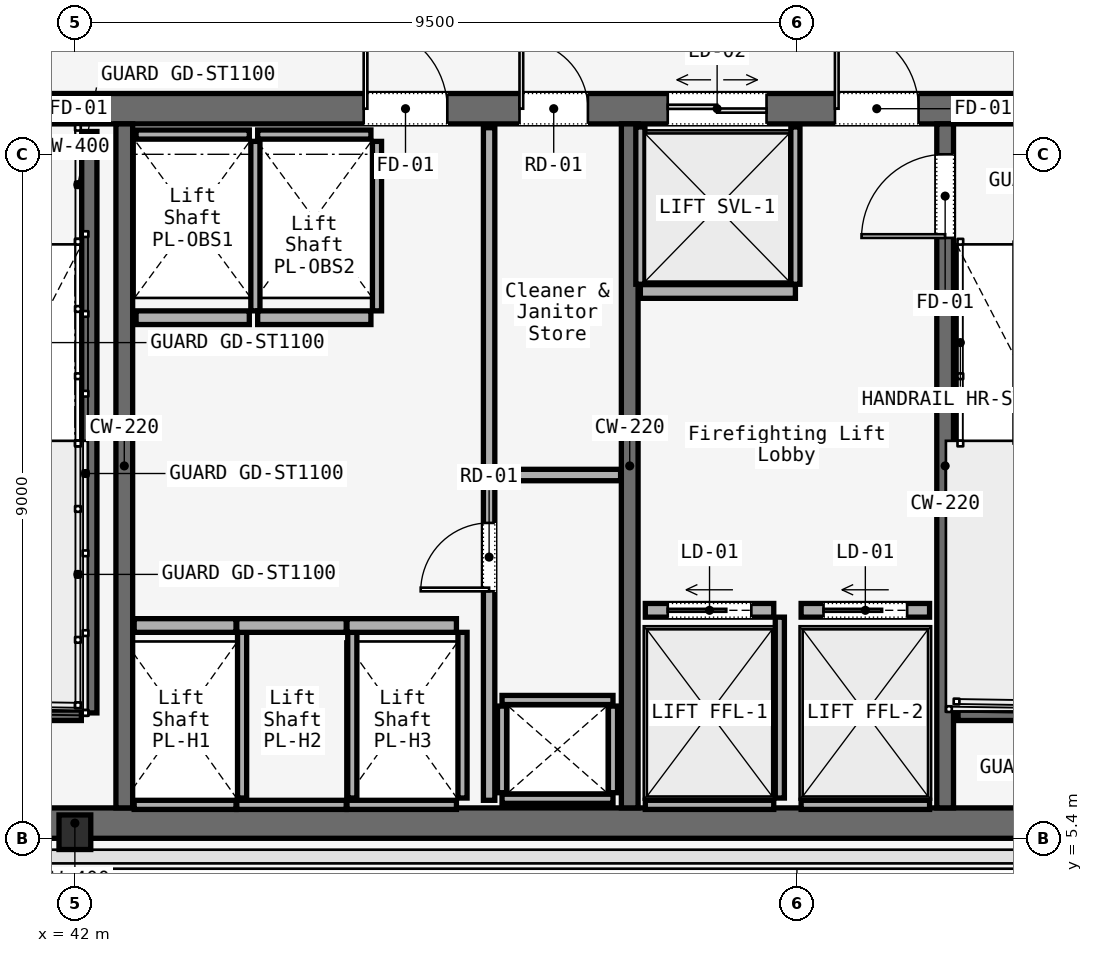
"""IFC4 building model, lengths in metres.
Left out: names, types, materials, properties, quantities, classifications, styles, units other than length and angle.
Written with IfcOpenShell. Run it as: python <this file> out.ifc"""

import sys

from ifc_helpers import new_model, si_unit, direction, frame, frame_2d, origin, origin_2d, place, context, subcontext, project, spatial, rectangle, i_section, extrude, element, fill, save


model = new_model("IFC4")
c1 = context("Model", 3, precision=1e-05, world=origin(), true_north=direction((0.0, 1.0)))
c2 = subcontext(c1, "Body", "Model", "MODEL_VIEW")
j1 = project(units=[si_unit("LENGTHUNIT", "METRE"), si_unit("PLANEANGLEUNIT", "RADIAN")], contexts=[c1])
p1 = place(None, origin())
s1 = spatial("IfcSite", under=j1, at=p1, CompositionType="ELEMENT")
p2 = place(p1, origin())
s2 = spatial("IfcBuilding", under=s1, at=p2, CompositionType="ELEMENT")
p3 = place(p2, frame((0.0, 0.0, 176.4)))
s3 = spatial("IfcBuildingStorey", under=s2, at=p3, CompositionType="ELEMENT", Elevation=176.4)
p4 = place(p3, frame((26.45, 15.0, 0.0), z_axis=(0.0, 0.0, 1.0), x_axis=(1.0, 0.0, 0.0)))
e1 = element("IfcWall", 1, at=p4, inside=s3, PredefinedType="SOLIDWALL", context=c2, shape_type="SweptSolid", body=[
    extrude(rectangle(XDim=31.1, YDim=0.4, at=frame_2d((15.55, 0.0))), origin(), (0.0, 0.0, 1.0), 3.58),
])
p5 = place(p4, frame((1.65, 0.0, 0.0)))
e2 = element("IfcOpeningElement", 2, at=p5, cuts=e1, PredefinedType="OPENING", context=c2, shape_type="SweptSolid", body=[
    extrude(rectangle(XDim=1.1, YDim=2.2, at=frame_2d((0.55, 1.1))), frame((0.0, 0.2, 0.0), z_axis=(0.0, -1.0, 0.0), x_axis=(1.0, 0.0, 0.0)), (0.0, 0.0, 1.0), 0.4),
])
p6 = place(p4, frame((13.65, 0.0, 0.0)))
e3 = element("IfcOpeningElement", 3, at=p6, cuts=e1, PredefinedType="OPENING", context=c2, shape_type="SweptSolid", body=[
    extrude(rectangle(XDim=1.1, YDim=2.2, at=frame_2d((0.55, 1.1))), frame((0.0, 0.2, 0.0), z_axis=(0.0, -1.0, 0.0), x_axis=(1.0, 0.0, 0.0)), (0.0, 0.0, 1.0), 0.4),
])
p7 = place(p4, frame((25.55, 0.0, 0.0)))
e4 = element("IfcOpeningElement", 4, at=p7, cuts=e1, PredefinedType="OPENING", context=c2, shape_type="SweptSolid", body=[
    extrude(rectangle(XDim=1.1, YDim=2.2, at=frame_2d((0.55, 1.1))), frame((0.0, 0.2, 0.0), z_axis=(0.0, -1.0, 0.0), x_axis=(1.0, 0.0, 0.0)), (0.0, 0.0, 1.0), 0.4),
])
p8 = place(p4, frame((10.7, 0.0, 0.0)))
e5 = element("IfcOpeningElement", 5, at=p8, cuts=e1, PredefinedType="OPENING", context=c2, shape_type="SweptSolid", body=[
    extrude(rectangle(XDim=1.4, YDim=2.2, at=frame_2d((0.7, 1.1))), frame((0.0, 0.2, 0.0), z_axis=(0.0, -1.0, 0.0), x_axis=(1.0, 0.0, 0.0)), (0.0, 0.0, 1.0), 0.4),
])
p9 = place(p4, frame((19.35, 0.0, 0.0)))
e6 = element("IfcOpeningElement", 6, at=p9, cuts=e1, PredefinedType="OPENING", context=c2, shape_type="SweptSolid", body=[
    extrude(rectangle(XDim=1.1, YDim=2.2, at=frame_2d((0.55, 1.1))), frame((0.0, 0.2, 0.0), z_axis=(0.0, -1.0, 0.0), x_axis=(1.0, 0.0, 0.0)), (0.0, 0.0, 1.0), 0.4),
])
p10 = place(p4, frame((21.4, 0.0, 0.0)))
e7 = element("IfcOpeningElement", 7, at=p10, cuts=e1, PredefinedType="OPENING", context=c2, shape_type="SweptSolid", body=[
    extrude(rectangle(XDim=0.9, YDim=2.1, at=frame_2d((0.45, 1.05))), frame((0.0, 0.2, 0.0), z_axis=(0.0, -1.0, 0.0), x_axis=(1.0, 0.0, 0.0)), (0.0, 0.0, 1.0), 0.4),
])
p11 = place(p4, frame((23.35, 0.0, 0.0)))
e8 = element("IfcOpeningElement", 8, at=p11, cuts=e1, PredefinedType="OPENING", context=c2, shape_type="SweptSolid", body=[
    extrude(rectangle(XDim=1.3, YDim=2.3, at=frame_2d((0.65, 1.15))), frame((0.0, 0.2, 0.0), z_axis=(0.0, -1.0, 0.0), x_axis=(1.0, 0.0, 0.0)), (0.0, 0.0, 1.0), 0.4),
])
p12 = place(p3, frame((26.45, 5.6, 0.0), z_axis=(0.0, 0.0, 1.0), x_axis=(1.0, 0.0, 0.0)))
e9 = element("IfcWall", 9, at=p12, inside=s3, PredefinedType="SOLIDWALL", context=c2, shape_type="SweptSolid", body=[
    extrude(rectangle(XDim=31.1, YDim=0.4, at=frame_2d((15.55, 0.0))), origin(), (0.0, 0.0, 1.0), 3.58),
])
for number, where, z_axis, x_axis in (
    (10, (42.65, 5.8, 0.0), (0.0, 0.0, 1.0), (0.0, 1.0, 0.0)),
    (11, (49.3, 5.8, 0.0), (0.0, 0.0, 1.0), (0.0, 1.0, 0.0)),
):
    element("IfcWall", number, at=place(p3, frame(where, z_axis=z_axis, x_axis=x_axis)), inside=s3, PredefinedType="SOLIDWALL", context=c2, shape_type="SweptSolid", body=[
        extrude(rectangle(XDim=9.0, YDim=0.22, at=frame_2d((4.5, 0.0))), origin(), (0.0, 0.0, 1.0), 3.58),
    ])
p13 = place(p3, frame((53.45, 5.8, 0.0), z_axis=(0.0, 0.0, 1.0), x_axis=(0.0, 1.0, 0.0)))
e12 = element("IfcWall", 12, at=p13, inside=s3, PredefinedType="SOLIDWALL", context=c2, shape_type="SweptSolid", body=[
    extrude(rectangle(XDim=9.0, YDim=0.22, at=frame_2d((4.5, 0.0))), origin(), (0.0, 0.0, 1.0), 3.58),
])
p14 = place(p13, frame((7.5, 0.0, 0.0)))
e13 = element("IfcOpeningElement", 13, at=p14, cuts=e12, PredefinedType="OPENING", context=c2, shape_type="SweptSolid", body=[
    extrude(rectangle(XDim=1.1, YDim=2.2, at=frame_2d((0.55, 1.1))), frame((0.0, 0.11, 0.0), z_axis=(0.0, -1.0, 0.0), x_axis=(1.0, 0.0, 0.0)), (0.0, 0.0, 1.0), 0.22),
])
p15 = place(p3, frame((42.0, 5.48, 0.0), z_axis=(0.0, 0.0, 1.0), x_axis=(1.0, 0.0, 0.0)))
e14 = element("IfcColumn", 14, at=p15, inside=s3, PredefinedType="COLUMN", context=c2, shape_type="SweptSolid", body=[
    extrude(i_section(OverallWidth=0.418, OverallDepth=0.455, WebThickness=0.042, FlangeThickness=0.052, FilletRadius=0.015, at=origin_2d()), origin(), (0.0, 0.0, 1.0), 3.58),
])
p16 = place(p3, frame((42.19, 14.7, 0.0), z_axis=(0.0, 0.0, 1.0), x_axis=(0.0, -1.0, 0.0)))
e15 = element("IfcWall", 15, at=p16, inside=s3, PredefinedType="SOLIDWALL", context=c2, shape_type="SweptSolid", body=[
    extrude(rectangle(XDim=7.65, YDim=0.2, at=frame_2d((3.825, 0.0))), origin(), (0.0, 0.0, 1.0), 3.8),
])
for number, where, z_axis, x_axis in (
    (16, (38.97, 7.05, 0.0), (0.0, 0.0, 1.0), (1.0, 0.0, 0.0)),
    (17, (53.62, 7.05, 0.0), (0.0, 0.0, 1.0), (1.0, 0.0, 0.0)),
):
    element("IfcWall", number, at=place(p3, frame(where, z_axis=z_axis, x_axis=x_axis)), inside=s3, PredefinedType="SOLIDWALL", context=c2, shape_type="SweptSolid", body=[
        extrude(rectangle(XDim=3.115, YDim=0.2, at=frame_2d((1.558, 0.0))), origin(), (0.0, 0.0, 1.0), 3.8),
    ])
for number, where, z_axis, x_axis in (
    (18, (47.62, 5.92, 0.0), (0.0, 0.0, 1.0), (1.0, 0.0, 0.0)),
    (19, (47.62, 7.22, 0.0), (0.0, 0.0, 1.0), (1.0, 0.0, 0.0)),
):
    element("IfcWall", number, at=place(p3, frame(where, z_axis=z_axis, x_axis=x_axis)), inside=s3, PredefinedType="SOLIDWALL", context=c2, shape_type="SweptSolid", body=[
        extrude(rectangle(XDim=1.46, YDim=0.12, at=frame_2d((0.73, 0.0))), origin(), (0.0, 0.0, 1.0), 3.01),
    ])
for number, where, z_axis, x_axis in (
    (20, (47.62, 6.0, 0.0), (0.0, 0.0, 1.0), (0.0, 1.0, 0.0)),
    (21, (49.08, 6.0, 0.0), (0.0, 0.0, 1.0), (0.0, 1.0, 0.0)),
):
    element("IfcWall", number, at=place(p3, frame(where, z_axis=z_axis, x_axis=x_axis)), inside=s3, PredefinedType="SOLIDWALL", context=c2, shape_type="SweptSolid", body=[
        extrude(rectangle(XDim=1.14, YDim=0.12, at=frame_2d((0.57, 0.0))), origin(), (0.0, 0.0, 1.0), 3.01),
    ])
p17 = place(p3, frame((47.45, 5.9, 0.0), z_axis=(0.0, 0.0, 1.0), x_axis=(0.0, 1.0, 0.0)))
e22 = element("IfcWall", 22, at=p17, inside=s3, PredefinedType="PARTITIONING", context=c2, shape_type="SweptSolid", body=[
    extrude(rectangle(XDim=8.85, YDim=0.15, at=frame_2d((4.425, 0.0))), origin(), (0.0, 0.0, 1.0), 3.01),
])
p18 = place(p17, frame((2.75, 0.0, 0.0)))
e23 = element("IfcOpeningElement", 23, at=p18, cuts=e22, PredefinedType="OPENING", context=c2, shape_type="SweptSolid", body=[
    extrude(rectangle(XDim=0.9, YDim=2.1, at=frame_2d((0.45, 1.05))), frame((0.0, 0.075, 0.0), z_axis=(0.0, -1.0, 0.0), x_axis=(1.0, 0.0, 0.0)), (0.0, 0.0, 1.0), 0.15),
])
p19 = place(p3, frame((47.45, 10.18, 0.0), z_axis=(0.0, 0.0, 1.0), x_axis=(1.0, 0.0, 0.0)))
e24 = element("IfcWall", 24, at=p19, inside=s3, PredefinedType="PARTITIONING", context=c2, shape_type="SweptSolid", body=[
    extrude(rectangle(XDim=1.73, YDim=0.15, at=frame_2d((0.865, 0.0))), origin(), (0.0, 0.0, 1.0), 3.01),
])
p20 = place(p3, frame((42.78, 8.2, 0.0), z_axis=(0.0, 0.0, 1.0), x_axis=(1.0, 0.0, 0.0)))
e25 = element("IfcWall", 25, at=p20, inside=s3, PredefinedType="SOLIDWALL", context=c2, shape_type="SweptSolid", body=[
    extrude(rectangle(XDim=1.34, YDim=0.18, at=frame_2d((0.67, 0.0))), origin(), (0.0, 0.0, 1.0), 3.01),
])
p21 = place(p3, frame((42.78, 5.84, 0.0), z_axis=(0.0, 0.0, 1.0), x_axis=(1.0, 0.0, 0.0)))
e26 = element("IfcWall", 26, at=p21, inside=s3, PredefinedType="SOLIDWALL", context=c2, shape_type="SweptSolid", body=[
    extrude(rectangle(XDim=1.34, YDim=0.12, at=frame_2d((0.67, 0.0))), origin(), (0.0, 0.0, 1.0), 3.01),
])
p22 = place(p3, frame((44.2, 5.93, 0.0), z_axis=(0.0, 0.0, 1.0), x_axis=(0.0, 1.0, 0.0)))
e27 = element("IfcWall", 27, at=p22, inside=s3, PredefinedType="SOLIDWALL", context=c2, shape_type="SweptSolid", body=[
    extrude(rectangle(XDim=2.18, YDim=0.12, at=frame_2d((1.09, 0.0))), origin(), (0.0, 0.0, 1.0), 3.01),
])
p23 = place(p3, frame((44.13, 8.2, 0.0), z_axis=(0.0, 0.0, 1.0), x_axis=(1.0, 0.0, 0.0)))
e28 = element("IfcWall", 28, at=p23, inside=s3, PredefinedType="SOLIDWALL", context=c2, shape_type="SweptSolid", body=[
    extrude(rectangle(XDim=1.44, YDim=0.18, at=frame_2d((0.72, 0.0))), origin(), (0.0, 0.0, 1.0), 3.01),
])
p24 = place(p3, frame((44.13, 5.84, 0.0), z_axis=(0.0, 0.0, 1.0), x_axis=(1.0, 0.0, 0.0)))
e29 = element("IfcWall", 29, at=p24, inside=s3, PredefinedType="SOLIDWALL", context=c2, shape_type="SweptSolid", body=[
    extrude(rectangle(XDim=1.44, YDim=0.12, at=frame_2d((0.72, 0.0))), origin(), (0.0, 0.0, 1.0), 3.01),
])
p25 = place(p3, frame((45.65, 5.93, 0.0), z_axis=(0.0, 0.0, 1.0), x_axis=(0.0, 1.0, 0.0)))
e30 = element("IfcWall", 30, at=p25, inside=s3, PredefinedType="SOLIDWALL", context=c2, shape_type="SweptSolid", body=[
    extrude(rectangle(XDim=2.18, YDim=0.12, at=frame_2d((1.09, 0.0))), origin(), (0.0, 0.0, 1.0), 3.01),
])
p26 = place(p3, frame((45.58, 8.2, 0.0), z_axis=(0.0, 0.0, 1.0), x_axis=(1.0, 0.0, 0.0)))
e31 = element("IfcWall", 31, at=p26, inside=s3, PredefinedType="SOLIDWALL", context=c2, shape_type="SweptSolid", body=[
    extrude(rectangle(XDim=1.44, YDim=0.18, at=frame_2d((0.72, 0.0))), origin(), (0.0, 0.0, 1.0), 3.01),
])
p27 = place(p3, frame((45.58, 5.84, 0.0), z_axis=(0.0, 0.0, 1.0), x_axis=(1.0, 0.0, 0.0)))
e32 = element("IfcWall", 32, at=p27, inside=s3, PredefinedType="SOLIDWALL", context=c2, shape_type="SweptSolid", body=[
    extrude(rectangle(XDim=1.44, YDim=0.12, at=frame_2d((0.72, 0.0))), origin(), (0.0, 0.0, 1.0), 3.01),
])
p28 = place(p3, frame((47.1, 5.93, 0.0), z_axis=(0.0, 0.0, 1.0), x_axis=(0.0, 1.0, 0.0)))
e33 = element("IfcWall", 33, at=p28, inside=s3, PredefinedType="SOLIDWALL", context=c2, shape_type="SweptSolid", body=[
    extrude(rectangle(XDim=2.18, YDim=0.12, at=frame_2d((1.09, 0.0))), origin(), (0.0, 0.0, 1.0), 3.01),
])
p29 = place(p3, frame((42.805, 12.25, 0.0), z_axis=(0.0, 0.0, 1.0), x_axis=(1.0, 0.0, 0.0)))
e34 = element("IfcWall", 34, at=p29, inside=s3, PredefinedType="SOLIDWALL", context=c2, shape_type="SweptSolid", body=[
    extrude(rectangle(XDim=1.49, YDim=0.18, at=frame_2d((0.745, 0.0))), origin(), (0.0, 0.0, 1.0), 3.01),
])
p30 = place(p3, frame((42.805, 14.66, 0.0), z_axis=(0.0, 0.0, 1.0), x_axis=(1.0, 0.0, 0.0)))
e35 = element("IfcWall", 35, at=p30, inside=s3, PredefinedType="SOLIDWALL", context=c2, shape_type="SweptSolid", body=[
    extrude(rectangle(XDim=1.49, YDim=0.12, at=frame_2d((0.745, 0.0))), origin(), (0.0, 0.0, 1.0), 3.01),
])
p31 = place(p3, frame((44.375, 12.34, 0.0), z_axis=(0.0, 0.0, 1.0), x_axis=(0.0, 1.0, 0.0)))
e36 = element("IfcWall", 36, at=p31, inside=s3, PredefinedType="SOLIDWALL", context=c2, shape_type="SweptSolid", body=[
    extrude(rectangle(XDim=2.23, YDim=0.12, at=frame_2d((1.115, 0.0))), origin(), (0.0, 0.0, 1.0), 3.01),
])
p32 = place(p3, frame((44.405, 12.25, 0.0), z_axis=(0.0, 0.0, 1.0), x_axis=(1.0, 0.0, 0.0)))
e37 = element("IfcWall", 37, at=p32, inside=s3, PredefinedType="SOLIDWALL", context=c2, shape_type="SweptSolid", body=[
    extrude(rectangle(XDim=1.49, YDim=0.18, at=frame_2d((0.745, 0.0))), origin(), (0.0, 0.0, 1.0), 3.01),
])
p33 = place(p3, frame((44.405, 14.66, 0.0), z_axis=(0.0, 0.0, 1.0), x_axis=(1.0, 0.0, 0.0)))
e38 = element("IfcWall", 38, at=p33, inside=s3, PredefinedType="SOLIDWALL", context=c2, shape_type="SweptSolid", body=[
    extrude(rectangle(XDim=1.49, YDim=0.12, at=frame_2d((0.745, 0.0))), origin(), (0.0, 0.0, 1.0), 3.01),
])
p34 = place(p3, frame((45.975, 12.34, 0.0), z_axis=(0.0, 0.0, 1.0), x_axis=(0.0, 1.0, 0.0)))
e39 = element("IfcWall", 39, at=p34, inside=s3, PredefinedType="SOLIDWALL", context=c2, shape_type="SweptSolid", body=[
    extrude(rectangle(XDim=2.23, YDim=0.12, at=frame_2d((1.115, 0.0))), origin(), (0.0, 0.0, 1.0), 3.01),
])
p35 = place(p3, frame((49.505, 8.4, 0.0), z_axis=(0.0, 0.0, 1.0), x_axis=(1.0, 0.0, 0.0)))
e40 = element("IfcWall", 40, at=p35, inside=s3, PredefinedType="SOLIDWALL", context=c2, shape_type="SweptSolid", body=[
    extrude(rectangle(XDim=1.69, YDim=0.18, at=frame_2d((0.845, 0.0))), origin(), (0.0, 0.0, 1.0), 3.01),
])
p36 = place(p35, frame((0.295, 0.0, 0.0)))
e41 = element("IfcOpeningElement", 41, at=p36, cuts=e40, PredefinedType="OPENING", context=c2, shape_type="SweptSolid", body=[
    extrude(rectangle(XDim=1.1, YDim=2.2, at=frame_2d((0.55, 1.1))), frame((0.0, 0.09, 0.0), z_axis=(0.0, -1.0, 0.0), x_axis=(1.0, 0.0, 0.0)), (0.0, 0.0, 1.0), 0.18),
])
p37 = place(p3, frame((49.505, 5.84, 0.0), z_axis=(0.0, 0.0, 1.0), x_axis=(1.0, 0.0, 0.0)))
e42 = element("IfcWall", 42, at=p37, inside=s3, PredefinedType="SOLIDWALL", context=c2, shape_type="SweptSolid", body=[
    extrude(rectangle(XDim=1.69, YDim=0.12, at=frame_2d((0.845, 0.0))), origin(), (0.0, 0.0, 1.0), 3.01),
])
p38 = place(p3, frame((51.275, 5.93, 0.0), z_axis=(0.0, 0.0, 1.0), x_axis=(0.0, 1.0, 0.0)))
e43 = element("IfcWall", 43, at=p38, inside=s3, PredefinedType="SOLIDWALL", context=c2, shape_type="SweptSolid", body=[
    extrude(rectangle(XDim=2.38, YDim=0.12, at=frame_2d((1.19, 0.0))), origin(), (0.0, 0.0, 1.0), 3.01),
])
p39 = place(p3, frame((51.555, 8.4, 0.0), z_axis=(0.0, 0.0, 1.0), x_axis=(1.0, 0.0, 0.0)))
e44 = element("IfcWall", 44, at=p39, inside=s3, PredefinedType="SOLIDWALL", context=c2, shape_type="SweptSolid", body=[
    extrude(rectangle(XDim=1.69, YDim=0.18, at=frame_2d((0.845, 0.0))), origin(), (0.0, 0.0, 1.0), 3.01),
])
p40 = place(p39, frame((0.295, 0.0, 0.0)))
e45 = element("IfcOpeningElement", 45, at=p40, cuts=e44, PredefinedType="OPENING", context=c2, shape_type="SweptSolid", body=[
    extrude(rectangle(XDim=1.1, YDim=2.2, at=frame_2d((0.55, 1.1))), frame((0.0, 0.09, 0.0), z_axis=(0.0, -1.0, 0.0), x_axis=(1.0, 0.0, 0.0)), (0.0, 0.0, 1.0), 0.18),
])
p41 = place(p3, frame((51.555, 5.84, 0.0), z_axis=(0.0, 0.0, 1.0), x_axis=(1.0, 0.0, 0.0)))
e46 = element("IfcWall", 46, at=p41, inside=s3, PredefinedType="SOLIDWALL", context=c2, shape_type="SweptSolid", body=[
    extrude(rectangle(XDim=1.69, YDim=0.12, at=frame_2d((0.845, 0.0))), origin(), (0.0, 0.0, 1.0), 3.01),
])
p42 = place(p3, frame((49.44, 12.595, 0.0), z_axis=(0.0, 0.0, 1.0), x_axis=(1.0, 0.0, 0.0)))
e47 = element("IfcWall", 47, at=p42, inside=s3, PredefinedType="SOLIDWALL", context=c2, shape_type="SweptSolid", body=[
    extrude(rectangle(XDim=2.04, YDim=0.18, at=frame_2d((1.02, 0.0))), origin(), (0.0, 0.0, 1.0), 3.01),
])
for number, where, z_axis, x_axis in (
    (48, (49.44, 12.69, 0.0), (0.0, 0.0, 1.0), (0.0, 1.0, 0.0)),
    (49, (51.48, 12.69, 0.0), (0.0, 0.0, 1.0), (0.0, 1.0, 0.0)),
):
    element("IfcWall", number, at=place(p3, frame(where, z_axis=z_axis, x_axis=x_axis)), inside=s3, PredefinedType="SOLIDWALL", context=c2, shape_type="SweptSolid", body=[
        extrude(rectangle(XDim=2.07, YDim=0.12, at=frame_2d((1.035, 0.0))), origin(), (0.0, 0.0, 1.0), 3.01),
    ])
p43 = place(p7, origin())
e50 = element("IfcDoor", 50, at=p43, inside=s3, OperationType="SINGLE_SWING_RIGHT", PredefinedType="DOOR", context=c2, shape_type="SweptSolid", body=[
    extrude(rectangle(XDim=1.1, YDim=2.2, at=frame_2d((0.55, 1.1))), frame((0.0, 0.025, 0.0), z_axis=(0.0, -1.0, 0.0), x_axis=(1.0, 0.0, 0.0)), (0.0, 0.0, 1.0), 0.05),
])
fill(e4, e50)
p44 = place(p9, origin())
e51 = element("IfcDoor", 51, at=p44, inside=s3, OperationType="SINGLE_SWING_LEFT", PredefinedType="DOOR", context=c2, shape_type="SweptSolid", body=[
    extrude(rectangle(XDim=1.1, YDim=2.2, at=frame_2d((0.55, 1.1))), frame((0.0, 0.025, 0.0), z_axis=(0.0, -1.0, 0.0), x_axis=(1.0, 0.0, 0.0)), (0.0, 0.0, 1.0), 0.05),
])
fill(e6, e51)
p45 = place(p10, origin())
e52 = element("IfcDoor", 52, at=p45, inside=s3, OperationType="SINGLE_SWING_LEFT", PredefinedType="DOOR", context=c2, shape_type="SweptSolid", body=[
    extrude(rectangle(XDim=0.9, YDim=2.1, at=frame_2d((0.45, 1.05))), frame((0.0, 0.025, 0.0), z_axis=(0.0, -1.0, 0.0), x_axis=(1.0, 0.0, 0.0)), (0.0, 0.0, 1.0), 0.05),
])
fill(e7, e52)
p46 = place(p14, origin())
e53 = element("IfcDoor", 53, at=p46, inside=s3, OperationType="SINGLE_SWING_LEFT", PredefinedType="DOOR", context=c2, shape_type="SweptSolid", body=[
    extrude(rectangle(XDim=1.1, YDim=2.2, at=frame_2d((0.55, 1.1))), frame((0.0, 0.025, 0.0), z_axis=(0.0, -1.0, 0.0), x_axis=(1.0, 0.0, 0.0)), (0.0, 0.0, 1.0), 0.05),
])
fill(e13, e53)
p47 = place(p18, origin())
e54 = element("IfcDoor", 54, at=p47, inside=s3, OperationType="SINGLE_SWING_RIGHT", PredefinedType="DOOR", context=c2, shape_type="SweptSolid", body=[
    extrude(rectangle(XDim=0.9, YDim=2.1, at=frame_2d((0.45, 1.05))), frame((0.0, 0.025, 0.0), z_axis=(0.0, -1.0, 0.0), x_axis=(1.0, 0.0, 0.0)), (0.0, 0.0, 1.0), 0.05),
])
fill(e23, e54)
p48 = place(p36, origin())
e55 = element("IfcDoor", 55, at=p48, inside=s3, OperationType="SLIDING_TO_LEFT", PredefinedType="DOOR", context=c2, shape_type="SweptSolid", body=[
    extrude(rectangle(XDim=1.1, YDim=2.2, at=frame_2d((0.55, 1.1))), frame((0.0, 0.025, 0.0), z_axis=(0.0, -1.0, 0.0), x_axis=(1.0, 0.0, 0.0)), (0.0, 0.0, 1.0), 0.05),
])
fill(e41, e55)
p49 = place(p40, origin())
e56 = element("IfcDoor", 56, at=p49, inside=s3, OperationType="SLIDING_TO_LEFT", PredefinedType="DOOR", context=c2, shape_type="SweptSolid", body=[
    extrude(rectangle(XDim=1.1, YDim=2.2, at=frame_2d((0.55, 1.1))), frame((0.0, 0.025, 0.0), z_axis=(0.0, -1.0, 0.0), x_axis=(1.0, 0.0, 0.0)), (0.0, 0.0, 1.0), 0.05),
])
fill(e45, e56)
p50 = place(p11, origin())
e57 = element("IfcDoor", 57, at=p50, inside=s3, OperationType="DOUBLE_DOOR_SLIDING", PredefinedType="DOOR", context=c2, shape_type="SweptSolid", body=[
    extrude(rectangle(XDim=1.3, YDim=2.3, at=frame_2d((0.65, 1.15))), frame((0.0, 0.025, 0.0), z_axis=(0.0, -1.0, 0.0), x_axis=(1.0, 0.0, 0.0)), (0.0, 0.0, 1.0), 0.05),
])
fill(e8, e57)
save(model, sys.argv[1])
